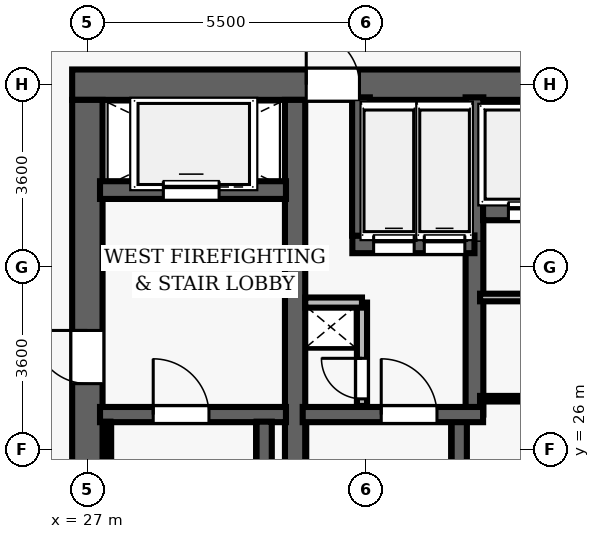
"""IFC4 building model, lengths in metres.
Left out: names, types, materials, properties, quantities, classifications, styles, units other than length and angle.
Written with IfcOpenShell. Run it as: python <this file> out.ifc"""

import sys

from ifc_helpers import new_model, si_unit, direction, frame, frame_2d, origin, place, context, subcontext, project, spatial, rectangle, extrude, element, fill, save


model = new_model("IFC4")
c1 = context("Model", 3, precision=1e-05, world=origin(), true_north=direction((0.0, 1.0)))
c2 = subcontext(c1, "Body", "Model", "MODEL_VIEW")
j1 = project(units=[si_unit("LENGTHUNIT", "METRE"), si_unit("PLANEANGLEUNIT", "RADIAN")], contexts=[c1])
p1 = place(None, origin())
s1 = spatial("IfcSite", under=j1, at=p1, CompositionType="ELEMENT")
p2 = place(p1, origin())
s2 = spatial("IfcBuilding", under=s1, at=p2, CompositionType="ELEMENT")
p3 = place(p2, frame((0.0, 0.0, 86.9)))
s3 = spatial("IfcBuildingStorey", under=s2, at=p3, CompositionType="ELEMENT", Elevation=86.9)
p4 = place(p3, frame((26.7, 33.2, 0.0), z_axis=(0.0, 0.0, 1.0), x_axis=(1.0, 0.0, 0.0)))
e1 = element("IfcWall", 1, at=p4, inside=s3, PredefinedType="SHEAR", context=c2, shape_type="SweptSolid", body=[
    extrude(rectangle(XDim=22.6, YDim=0.6, at=frame_2d((11.3, 0.0))), origin(), (0.0, 0.0, 1.0), 3.5),
])
p5 = place(p4, frame((4.62, 0.0, 0.0)))
e2 = element("IfcOpeningElement", 2, at=p5, cuts=e1, PredefinedType="OPENING", context=c2, shape_type="SweptSolid", body=[
    extrude(rectangle(XDim=1.05, YDim=2.15, at=frame_2d((0.525, 1.075))), frame((0.0, 0.31, 0.0), z_axis=(0.0, -1.0, 0.0), x_axis=(1.0, 0.0, 0.0)), (0.0, 0.0, 1.0), 0.62),
])
p6 = place(p4, frame((14.52, 0.0, 0.0)))
e3 = element("IfcOpeningElement", 3, at=p6, cuts=e1, PredefinedType="OPENING", context=c2, shape_type="SweptSolid", body=[
    extrude(rectangle(XDim=1.05, YDim=2.15, at=frame_2d((0.525, 1.075))), frame((0.0, 0.31, 0.0), z_axis=(0.0, -1.0, 0.0), x_axis=(1.0, 0.0, 0.0)), (0.0, 0.0, 1.0), 0.62),
])
p7 = place(p3, frame((27.0, 19.1, 0.0), z_axis=(0.0, 0.0, 1.0), x_axis=(0.0, 1.0, 0.0)))
e4 = element("IfcWall", 4, at=p7, inside=s3, PredefinedType="SHEAR", context=c2, shape_type="SweptSolid", body=[
    extrude(rectangle(XDim=13.8, YDim=0.6, at=frame_2d((6.9, 0.0))), origin(), (0.0, 0.0, 1.0), 3.5),
])
p8 = place(p7, frame((8.2, 0.0, 0.0)))
e5 = element("IfcOpeningElement", 5, at=p8, cuts=e4, PredefinedType="OPENING", context=c2, shape_type="SweptSolid", body=[
    extrude(rectangle(XDim=1.05, YDim=2.15, at=frame_2d((0.525, 1.075))), frame((0.0, 0.31, 0.0), z_axis=(0.0, -1.0, 0.0), x_axis=(1.0, 0.0, 0.0)), (0.0, 0.0, 1.0), 0.62),
])
p9 = place(p3, frame((31.1, 19.1, 0.0), z_axis=(0.0, 0.0, 1.0), x_axis=(0.0, 1.0, 0.0)))
e6 = element("IfcWall", 6, at=p9, inside=s3, PredefinedType="SHEAR", context=c2, shape_type="SweptSolid", body=[
    extrude(rectangle(XDim=13.8, YDim=0.4, at=frame_2d((6.9, 0.0))), origin(), (0.0, 0.0, 1.0), 3.5),
])
p10 = place(p3, frame((27.25, 26.69, 0.0), z_axis=(0.0, 0.0, 1.0), x_axis=(1.0, 0.0, 0.0)))
e7 = element("IfcWall", 7, at=p10, inside=s3, PredefinedType="SHEAR", context=c2, shape_type="SweptSolid", body=[
    extrude(rectangle(XDim=3.67, YDim=0.3, at=frame_2d((1.835, 0.0))), origin(), (0.0, 0.0, 1.0), 3.5),
])
p11 = place(p10, frame((1.05, 0.0, 0.0)))
e8 = element("IfcOpeningElement", 8, at=p11, cuts=e7, PredefinedType="OPENING", context=c2, shape_type="SweptSolid", body=[
    extrude(rectangle(XDim=1.1, YDim=2.15, at=frame_2d((0.55, 1.075))), frame((0.0, 0.16, 0.0), z_axis=(0.0, -1.0, 0.0), x_axis=(1.0, 0.0, 0.0)), (0.0, 0.0, 1.0), 0.32),
])
p12 = place(p3, frame((30.49, 19.05, 0.0), z_axis=(0.0, 0.0, 1.0), x_axis=(0.0, 1.0, 0.0)))
e9 = element("IfcWall", 9, at=p12, inside=s3, PredefinedType="SHEAR", context=c2, shape_type="SweptSolid", body=[
    extrude(rectangle(XDim=7.5, YDim=0.3, at=frame_2d((3.75, 0.0))), origin(), (0.0, 0.0, 1.0), 3.5),
])
p13 = place(p3, frame((27.395, 19.1, 0.0), z_axis=(0.0, 0.0, 1.0), x_axis=(0.0, 1.0, 0.0)))
e10 = element("IfcWall", 10, at=p13, inside=s3, PredefinedType="SHEAR", context=c2, shape_type="SweptSolid", body=[
    extrude(rectangle(XDim=7.45, YDim=0.12, at=frame_2d((3.725, 0.0))), origin(), (0.0, 0.0, 1.0), 3.5),
])
p14 = place(p3, frame((27.25, 31.12, 0.0), z_axis=(0.0, 0.0, 1.0), x_axis=(1.0, 0.0, 0.0)))
e11 = element("IfcWall", 11, at=p14, inside=s3, PredefinedType="SHEAR", context=c2, shape_type="SweptSolid", body=[
    extrude(rectangle(XDim=3.67, YDim=0.35, at=frame_2d((1.835, 0.0))), origin(), (0.0, 0.0, 1.0), 2.6),
])
p15 = place(p14, frame((1.25, 0.0, 0.0)))
e12 = element("IfcOpeningElement", 12, at=p15, cuts=e11, PredefinedType="OPENING", context=c2, shape_type="SweptSolid", body=[
    extrude(rectangle(XDim=1.1, YDim=2.15, at=frame_2d((0.55, 1.075))), frame((0.0, 0.185, 0.0), z_axis=(0.0, -1.0, 0.0), x_axis=(1.0, 0.0, 0.0)), (0.0, 0.0, 1.0), 0.37),
])
p16 = place(p3, frame((34.34, 19.05, 0.0), z_axis=(0.0, 0.0, 1.0), x_axis=(0.0, 1.0, 0.0)))
e13 = element("IfcWall", 13, at=p16, inside=s3, PredefinedType="SHEAR", context=c2, shape_type="SweptSolid", body=[
    extrude(rectangle(XDim=7.5, YDim=0.3, at=frame_2d((3.75, 0.0))), origin(), (0.0, 0.0, 1.0), 3.5),
])
p17 = place(p3, frame((34.64, 26.69, 0.0), z_axis=(0.0, 0.0, 1.0), x_axis=(0.0, 1.0, 0.0)))
e14 = element("IfcWall", 14, at=p17, inside=s3, PredefinedType="SHEAR", context=c2, shape_type="SweptSolid", body=[
    extrude(rectangle(XDim=6.26, YDim=0.35, at=frame_2d((3.13, 0.0))), origin(), (0.0, 0.0, 1.0), 3.5),
])
p18 = place(p3, frame((31.25, 26.69, 0.0), z_axis=(0.0, 0.0, 1.0), x_axis=(1.0, 0.0, 0.0)))
e15 = element("IfcWall", 15, at=p18, inside=s3, PredefinedType="SHEAR", context=c2, shape_type="SweptSolid", body=[
    extrude(rectangle(XDim=3.56, YDim=0.3, at=frame_2d((1.78, 0.0))), origin(), (0.0, 0.0, 1.0), 3.5),
])
p19 = place(p18, frame((1.55, 0.0, 0.0)))
e16 = element("IfcOpeningElement", 16, at=p19, cuts=e15, PredefinedType="OPENING", context=c2, shape_type="SweptSolid", body=[
    extrude(rectangle(XDim=1.1, YDim=2.15, at=frame_2d((0.55, 1.075))), frame((0.0, 0.16, 0.0), z_axis=(0.0, -1.0, 0.0), x_axis=(1.0, 0.0, 0.0)), (0.0, 0.0, 1.0), 0.32),
])
p20 = place(p3, frame((32.23, 30.05, 0.0), z_axis=(0.0, 0.0, 1.0), x_axis=(1.0, 0.0, 0.0)))
e17 = element("IfcWall", 17, at=p20, inside=s3, PredefinedType="SHEAR", context=c2, shape_type="SweptSolid", body=[
    extrude(rectangle(XDim=2.41, YDim=0.35, at=frame_2d((1.205, 0.0))), origin(), (0.0, 0.0, 1.0), 2.6),
])
p21 = place(p20, frame((0.42, 0.0, 0.0)))
e18 = element("IfcOpeningElement", 18, at=p21, cuts=e17, PredefinedType="OPENING", context=c2, shape_type="SweptSolid", body=[
    extrude(rectangle(XDim=0.8, YDim=2.15, at=frame_2d((0.4, 1.075))), frame((0.0, 0.185, 0.0), z_axis=(0.0, -1.0, 0.0), x_axis=(1.0, 0.0, 0.0)), (0.0, 0.0, 1.0), 0.37),
])
p22 = place(p20, frame((1.42, 0.0, 0.0)))
e19 = element("IfcOpeningElement", 19, at=p22, cuts=e17, PredefinedType="OPENING", context=c2, shape_type="SweptSolid", body=[
    extrude(rectangle(XDim=0.8, YDim=2.15, at=frame_2d((0.4, 1.075))), frame((0.0, 0.185, 0.0), z_axis=(0.0, -1.0, 0.0), x_axis=(1.0, 0.0, 0.0)), (0.0, 0.0, 1.0), 0.37),
])
p23 = place(p3, frame((32.4, 30.22, 0.0), z_axis=(0.0, 0.0, 1.0), x_axis=(0.0, 1.0, 0.0)))
e20 = element("IfcWall", 20, at=p23, inside=s3, PredefinedType="SHEAR", context=c2, shape_type="SweptSolid", body=[
    extrude(rectangle(XDim=2.73, YDim=0.35, at=frame_2d((1.365, 0.0))), origin(), (0.0, 0.0, 1.0), 2.6),
])
p24 = place(p3, frame((32.42, 26.86, 0.0), z_axis=(0.0, 0.0, 1.0), x_axis=(0.0, 1.0, 0.0)))
e21 = element("IfcWall", 21, at=p24, inside=s3, PredefinedType="PARTITIONING", context=c2, shape_type="SweptSolid", body=[
    extrude(rectangle(XDim=2.04, YDim=0.2, at=frame_2d((1.02, 0.0))), origin(), (0.0, 0.0, 1.0), 2.6),
])
p25 = place(p24, frame((0.14, 0.0, 0.0)))
e22 = element("IfcOpeningElement", 22, at=p25, cuts=e21, PredefinedType="OPENING", context=c2, shape_type="SweptSolid", body=[
    extrude(rectangle(XDim=0.8, YDim=2.05, at=frame_2d((0.4, 1.025))), frame((0.0, 0.11, 0.0), z_axis=(0.0, -1.0, 0.0), x_axis=(1.0, 0.0, 0.0)), (0.0, 0.0, 1.0), 0.22),
])
p26 = place(p3, frame((31.3, 28.9, 0.0), z_axis=(0.0, 0.0, 1.0), x_axis=(1.0, 0.0, 0.0)))
e23 = element("IfcWall", 23, at=p26, inside=s3, PredefinedType="PARTITIONING", context=c2, shape_type="SweptSolid", body=[
    extrude(rectangle(XDim=1.12, YDim=0.2, at=frame_2d((0.56, 0.0))), origin(), (0.0, 0.0, 1.0), 2.6),
])
p27 = place(p3, frame((34.81, 30.7, 0.0), z_axis=(0.0, 0.0, 1.0), x_axis=(1.0, 0.0, 0.0)))
e24 = element("IfcWall", 24, at=p27, inside=s3, PredefinedType="SHEAR", context=c2, shape_type="SweptSolid", body=[
    extrude(rectangle(XDim=6.36, YDim=0.35, at=frame_2d((3.18, 0.0))), origin(), (0.0, 0.0, 1.0), 2.6),
])
p28 = place(p27, frame((0.5, 0.0, 0.0)))
e25 = element("IfcOpeningElement", 25, at=p28, cuts=e24, PredefinedType="OPENING", context=c2, shape_type="SweptSolid", body=[
    extrude(rectangle(XDim=0.9, YDim=2.15, at=frame_2d((0.45, 1.075))), frame((0.0, 0.185, 0.0), z_axis=(0.0, -1.0, 0.0), x_axis=(1.0, 0.0, 0.0)), (0.0, 0.0, 1.0), 0.37),
])
p29 = place(p27, frame((2.58, 0.0, 0.0)))
e26 = element("IfcOpeningElement", 26, at=p29, cuts=e24, PredefinedType="OPENING", context=c2, shape_type="SweptSolid", body=[
    extrude(rectangle(XDim=0.9, YDim=2.15, at=frame_2d((0.45, 1.075))), frame((0.0, 0.185, 0.0), z_axis=(0.0, -1.0, 0.0), x_axis=(1.0, 0.0, 0.0)), (0.0, 0.0, 1.0), 0.37),
])
p30 = place(p27, frame((4.66, 0.0, 0.0)))
e27 = element("IfcOpeningElement", 27, at=p30, cuts=e24, PredefinedType="OPENING", context=c2, shape_type="SweptSolid", body=[
    extrude(rectangle(XDim=0.9, YDim=2.15, at=frame_2d((0.45, 1.075))), frame((0.0, 0.185, 0.0), z_axis=(0.0, -1.0, 0.0), x_axis=(1.0, 0.0, 0.0)), (0.0, 0.0, 1.0), 0.37),
])
p31 = place(p3, frame((34.75, 29.0, 0.0), z_axis=(0.0, 0.0, 1.0), x_axis=(1.0, 0.0, 0.0)))
e28 = element("IfcWall", 28, at=p31, inside=s3, PredefinedType="PARTITIONING", context=c2, shape_type="SweptSolid", body=[
    extrude(rectangle(XDim=6.25, YDim=0.15, at=frame_2d((3.125, 0.0))), origin(), (0.0, 0.0, 1.0), 2.6),
])
p32 = place(p3, frame((34.75, 27.003, 0.0), z_axis=(0.0, 0.0, 1.0), x_axis=(1.0, 0.0, 0.0)))
e29 = element("IfcWall", 29, at=p32, inside=s3, PredefinedType="PARTITIONING", context=c2, shape_type="SweptSolid", body=[
    extrude(rectangle(XDim=6.25, YDim=0.11, at=frame_2d((3.125, 0.0))), origin(), (0.0, 0.0, 1.0), 2.6),
])
p33 = place(p11, origin())
e30 = element("IfcDoor", 30, at=p33, inside=s3, OperationType="SINGLE_SWING_LEFT", PredefinedType="DOOR", context=c2, shape_type="SweptSolid", body=[
    extrude(rectangle(XDim=1.1, YDim=2.15, at=frame_2d((0.55, 1.075))), frame((0.0, 0.025, 0.0), z_axis=(0.0, -1.0, 0.0), x_axis=(1.0, 0.0, 0.0)), (0.0, 0.0, 1.0), 0.05),
])
fill(e8, e30)
p34 = place(p8, origin())
e31 = element("IfcDoor", 31, at=p34, inside=s3, OperationType="SINGLE_SWING_RIGHT", PredefinedType="DOOR", context=c2, shape_type="SweptSolid", body=[
    extrude(rectangle(XDim=1.05, YDim=2.15, at=frame_2d((0.525, 1.075))), frame((0.0, 0.025, 0.0), z_axis=(0.0, -1.0, 0.0), x_axis=(1.0, 0.0, 0.0)), (0.0, 0.0, 1.0), 0.05),
])
fill(e5, e31)
p35 = place(p19, origin())
e32 = element("IfcDoor", 32, at=p35, inside=s3, OperationType="SINGLE_SWING_LEFT", PredefinedType="DOOR", context=c2, shape_type="SweptSolid", body=[
    extrude(rectangle(XDim=1.1, YDim=2.15, at=frame_2d((0.55, 1.075))), frame((0.0, 0.025, 0.0), z_axis=(0.0, -1.0, 0.0), x_axis=(1.0, 0.0, 0.0)), (0.0, 0.0, 1.0), 0.05),
])
fill(e16, e32)
p36 = place(p25, origin())
e33 = element("IfcDoor", 33, at=p36, inside=s3, OperationType="SINGLE_SWING_RIGHT", PredefinedType="DOOR", context=c2, shape_type="SweptSolid", body=[
    extrude(rectangle(XDim=0.8, YDim=2.05, at=frame_2d((0.4, 1.025))), frame((0.0, 0.025, 0.0), z_axis=(0.0, -1.0, 0.0), x_axis=(1.0, 0.0, 0.0)), (0.0, 0.0, 1.0), 0.05),
])
fill(e22, e33)
p37 = place(p5, origin())
e34 = element("IfcDoor", 34, at=p37, inside=s3, OperationType="SINGLE_SWING_LEFT", PredefinedType="DOOR", context=c2, shape_type="SweptSolid", body=[
    extrude(rectangle(XDim=1.05, YDim=2.15, at=frame_2d((0.525, 1.075))), frame((0.0, 0.025, 0.0), z_axis=(0.0, -1.0, 0.0), x_axis=(1.0, 0.0, 0.0)), (0.0, 0.0, 1.0), 0.05),
])
fill(e2, e34)
p38 = place(p28, origin())
e35 = element("IfcDoor", 35, at=p38, inside=s3, OperationType="SLIDING_TO_LEFT", PredefinedType="DOOR", context=c2, shape_type="SweptSolid", body=[
    extrude(rectangle(XDim=0.9, YDim=2.15, at=frame_2d((0.45, 1.075))), frame((0.0, 0.025, 0.0), z_axis=(0.0, -1.0, 0.0), x_axis=(1.0, 0.0, 0.0)), (0.0, 0.0, 1.0), 0.05),
])
fill(e25, e35)
p39 = place(p15, origin())
e36 = element("IfcDoor", 36, at=p39, inside=s3, OperationType="SLIDING_TO_LEFT", PredefinedType="DOOR", context=c2, shape_type="SweptSolid", body=[
    extrude(rectangle(XDim=1.1, YDim=2.15, at=frame_2d((0.55, 1.075))), frame((0.0, 0.025, 0.0), z_axis=(0.0, -1.0, 0.0), x_axis=(1.0, 0.0, 0.0)), (0.0, 0.0, 1.0), 0.05),
])
fill(e12, e36)
p40 = place(p21, origin())
e37 = element("IfcDoor", 37, at=p40, inside=s3, OperationType="SLIDING_TO_LEFT", PredefinedType="DOOR", context=c2, shape_type="SweptSolid", body=[
    extrude(rectangle(XDim=0.8, YDim=2.15, at=frame_2d((0.4, 1.075))), frame((0.0, 0.025, 0.0), z_axis=(0.0, -1.0, 0.0), x_axis=(1.0, 0.0, 0.0)), (0.0, 0.0, 1.0), 0.05),
])
fill(e18, e37)
p41 = place(p22, origin())
e38 = element("IfcDoor", 38, at=p41, inside=s3, OperationType="SLIDING_TO_LEFT", PredefinedType="DOOR", context=c2, shape_type="SweptSolid", body=[
    extrude(rectangle(XDim=0.8, YDim=2.15, at=frame_2d((0.4, 1.075))), frame((0.0, 0.025, 0.0), z_axis=(0.0, -1.0, 0.0), x_axis=(1.0, 0.0, 0.0)), (0.0, 0.0, 1.0), 0.05),
])
fill(e19, e38)
save(model, sys.argv[1])
